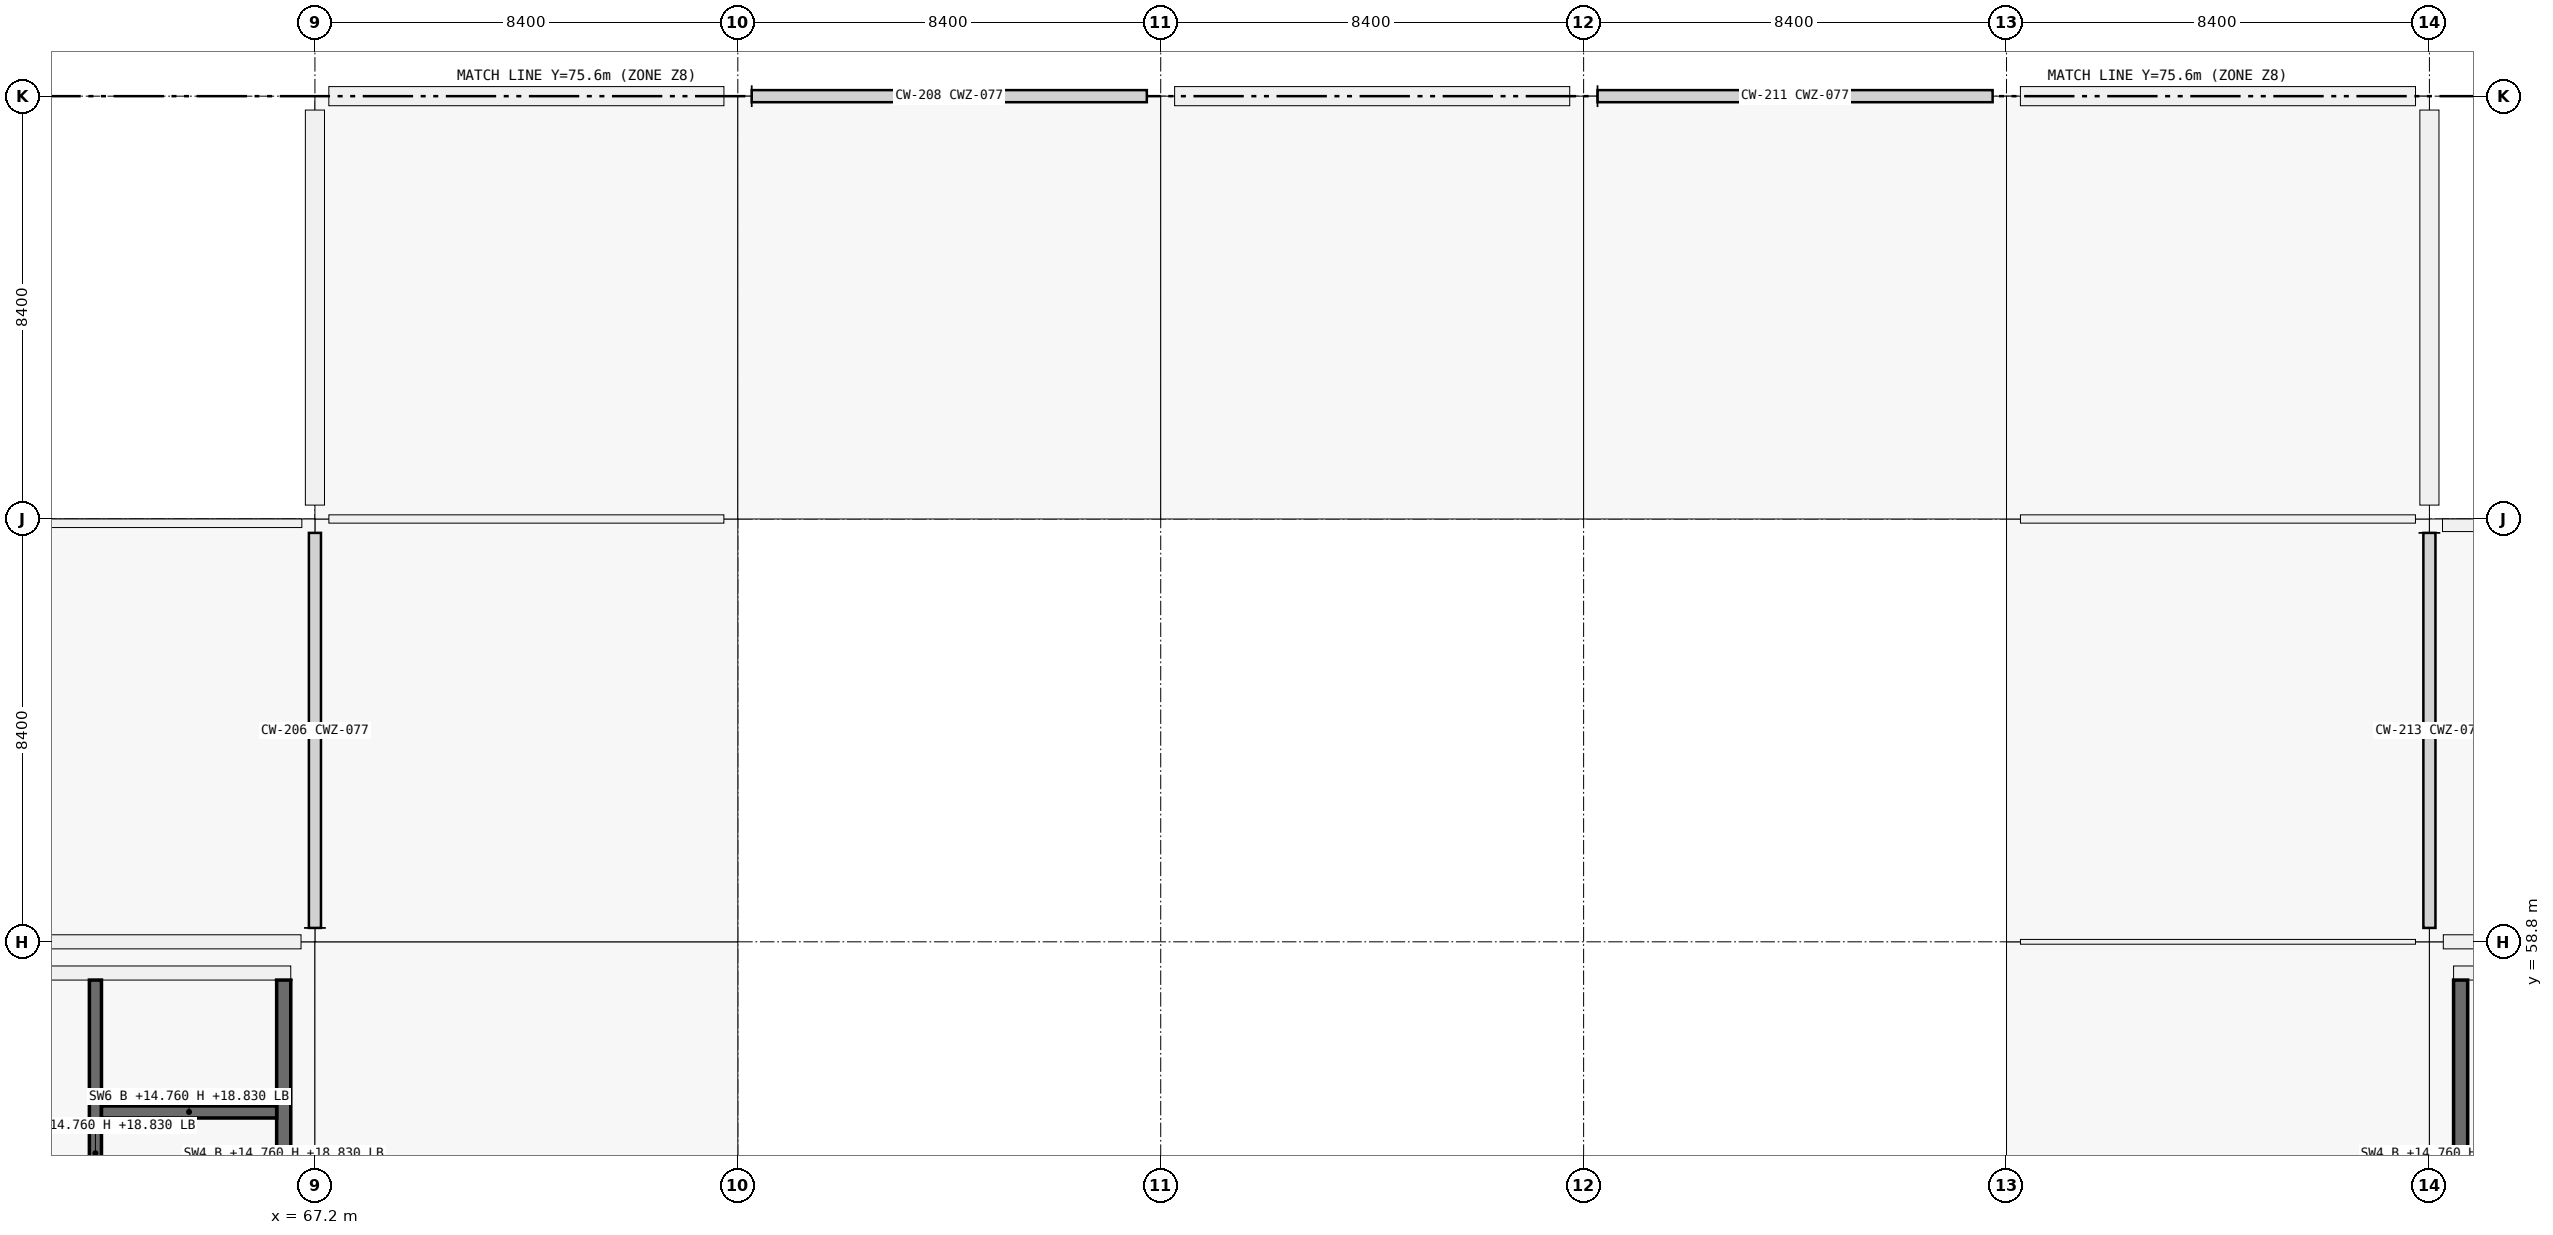
"""IFC4 building model, lengths in metres.
Left out: names, types, materials, properties, quantities, classifications, styles, units other than length and angle.
Written with IfcOpenShell. Run it as: python <this file> out.ifc"""

import sys

from ifc_helpers import new_model, si_unit, direction, frame, frame_2d, origin, origin_2d, place, context, subcontext, project, spatial, rectangle, i_section, extrude, element, fill, save


model = new_model("IFC4")
c1 = context("Model", 3, precision=1e-05, world=origin(), true_north=direction((0.0, 1.0)))
c2 = subcontext(c1, "Body", "Model", "MODEL_VIEW")
j1 = project(units=[si_unit("LENGTHUNIT", "METRE"), si_unit("PLANEANGLEUNIT", "RADIAN")], contexts=[c1])
p1 = place(None, origin())
s1 = spatial("IfcSite", under=j1, at=p1, CompositionType="ELEMENT")
p2 = place(p1, origin())
s2 = spatial("IfcBuilding", under=s1, at=p2, CompositionType="ELEMENT")
p3 = place(p2, frame((0.0, 0.0, 14.76)))
s3 = spatial("IfcBuildingStorey", under=s2, at=p3, CompositionType="ELEMENT", Elevation=14.76)
for number, where, z_axis, x_axis in (
    (1, (67.2, 58.8, 0.0), (0.0, 0.0, 1.0), (1.0, 0.0, 0.0)),
    (2, (67.2, 67.2, 0.0), (0.0, 0.0, 1.0), (1.0, 0.0, 0.0)),
    (3, (67.2, 75.6, 0.0), (0.0, 0.0, 1.0), (1.0, 0.0, 0.0)),
    (4, (75.6, 58.8, 0.0), (0.0, 0.0, 1.0), (1.0, 0.0, 0.0)),
    (5, (75.6, 67.2, 0.0), (0.0, 0.0, 1.0), (1.0, 0.0, 0.0)),
    (6, (75.6, 75.6, 0.0), (0.0, 0.0, 1.0), (1.0, 0.0, 0.0)),
    (7, (84.0, 67.2, 0.0), (0.0, 0.0, 1.0), (1.0, 0.0, 0.0)),
    (8, (84.0, 75.6, 0.0), (0.0, 0.0, 1.0), (1.0, 0.0, 0.0)),
    (9, (92.4, 67.2, 0.0), (0.0, 0.0, 1.0), (1.0, 0.0, 0.0)),
    (10, (92.4, 75.6, 0.0), (0.0, 0.0, 1.0), (1.0, 0.0, 0.0)),
    (11, (100.8, 58.8, 0.0), (0.0, 0.0, 1.0), (1.0, 0.0, 0.0)),
    (12, (100.8, 67.2, 0.0), (0.0, 0.0, 1.0), (1.0, 0.0, 0.0)),
    (13, (100.8, 75.6, 0.0), (0.0, 0.0, 1.0), (1.0, 0.0, 0.0)),
    (14, (109.2, 58.8, 0.0), (0.0, 0.0, 1.0), (1.0, 0.0, 0.0)),
    (15, (109.2, 67.2, 0.0), (0.0, 0.0, 1.0), (1.0, 0.0, 0.0)),
    (16, (109.2, 75.6, 0.0), (0.0, 0.0, 1.0), (1.0, 0.0, 0.0)),
):
    element("IfcColumn", number, at=place(p3, frame(where, z_axis=z_axis, x_axis=x_axis)), inside=s3, PredefinedType="COLUMN", context=c2, shape_type="SweptSolid", body=[
        extrude(rectangle(XDim=0.55, YDim=0.55, at=origin_2d()), origin(), (0.0, 0.0, 1.0), 4.14),
    ])
p4 = place(p3, frame((67.2, 58.8, 4.14), z_axis=(0.0, 0.0, 1.0), x_axis=(1.0, 0.0, 0.0)))
e17 = element("IfcColumn", 17, at=p4, inside=s3, PredefinedType="COLUMN", context=c2, shape_type="SweptSolid", body=[
    extrude(i_section(OverallWidth=0.305, OverallDepth=0.308, WebThickness=0.01, FlangeThickness=0.015, FilletRadius=0.017, at=origin_2d()), origin(), (0.0, 0.0, 1.0), 2.558),
])
p5 = place(p3, frame((67.2, 67.2, 4.14), z_axis=(0.0, 0.0, 1.0), x_axis=(1.0, 0.0, 0.0)))
e18 = element("IfcColumn", 18, at=p5, inside=s3, PredefinedType="COLUMN", context=c2, shape_type="SweptSolid", body=[
    extrude(i_section(OverallWidth=0.305, OverallDepth=0.308, WebThickness=0.01, FlangeThickness=0.015, FilletRadius=0.017, at=origin_2d()), origin(), (0.0, 0.0, 1.0), 1.709),
])
p6 = place(p3, frame((109.2, 58.8, 4.14), z_axis=(0.0, 0.0, 1.0), x_axis=(1.0, 0.0, 0.0)))
e19 = element("IfcColumn", 19, at=p6, inside=s3, PredefinedType="COLUMN", context=c2, shape_type="SweptSolid", body=[
    extrude(i_section(OverallWidth=0.305, OverallDepth=0.308, WebThickness=0.01, FlangeThickness=0.015, FilletRadius=0.017, at=origin_2d()), origin(), (0.0, 0.0, 1.0), 2.558),
])
p7 = place(p3, frame((109.2, 67.2, 4.14), z_axis=(0.0, 0.0, 1.0), x_axis=(1.0, 0.0, 0.0)))
e20 = element("IfcColumn", 20, at=p7, inside=s3, PredefinedType="COLUMN", context=c2, shape_type="SweptSolid", body=[
    extrude(i_section(OverallWidth=0.305, OverallDepth=0.308, WebThickness=0.01, FlangeThickness=0.015, FilletRadius=0.017, at=origin_2d()), origin(), (0.0, 0.0, 1.0), 1.709),
])
p8 = place(p3, frame((59.076, 58.8, 0.0), z_axis=(0.0, 0.0, 1.0), x_axis=(1.0, 0.0, 0.0)))
e21 = element("IfcWall", 21, at=p8, inside=s3, PredefinedType="SOLIDWALL", context=c2, shape_type="SweptSolid", body=[
    extrude(rectangle(XDim=7.848, YDim=0.28, at=frame_2d((3.924, 0.0))), origin(), (0.0, 0.0, 1.0), 3.37),
])
for number, where, z_axis, x_axis in (
    (22, (67.2, 67.476, 0.0), (0.0, 0.0, 1.0), (0.0, 1.0, 0.0)),
    (23, (67.476, 75.6, 0.0), (0.0, 0.0, 1.0), (1.0, 0.0, 0.0)),
):
    element("IfcWall", number, at=place(p3, frame(where, z_axis=z_axis, x_axis=x_axis)), inside=s3, PredefinedType="SOLIDWALL", context=c2, shape_type="SweptSolid", body=[
        extrude(rectangle(XDim=7.848, YDim=0.38, at=frame_2d((3.924, 0.0))), origin(), (0.0, 0.0, 1.0), 2.52),
    ])
for number, where, z_axis, x_axis in (
    (24, (84.276, 75.6, 0.0), (0.0, 0.0, 1.0), (1.0, 0.0, 0.0)),
    (25, (101.076, 75.6, 0.0), (0.0, 0.0, 1.0), (1.0, 0.0, 0.0)),
):
    element("IfcWall", number, at=place(p3, frame(where, z_axis=z_axis, x_axis=x_axis)), inside=s3, PredefinedType="SOLIDWALL", context=c2, shape_type="SweptSolid", body=[
        extrude(rectangle(XDim=7.848, YDim=0.38, at=frame_2d((3.924, 0.0))), origin(), (0.0, 0.0, 1.0), 2.52),
    ])
p9 = place(p3, frame((109.2, 75.324, 0.0), z_axis=(0.0, 0.0, 1.0), x_axis=(0.0, -1.0, 0.0)))
e26 = element("IfcWall", 26, at=p9, inside=s3, PredefinedType="SOLIDWALL", context=c2, shape_type="SweptSolid", body=[
    extrude(rectangle(XDim=7.848, YDim=0.38, at=frame_2d((3.924, 0.0))), origin(), (0.0, 0.0, 1.0), 2.52),
])
p10 = place(p3, frame((109.476, 58.8, 0.0), z_axis=(0.0, 0.0, 1.0), x_axis=(1.0, 0.0, 0.0)))
e27 = element("IfcWall", 27, at=p10, inside=s3, PredefinedType="SOLIDWALL", context=c2, shape_type="SweptSolid", body=[
    extrude(rectangle(XDim=7.848, YDim=0.28, at=frame_2d((3.924, 0.0))), origin(), (0.0, 0.0, 1.0), 3.37),
])
p11 = place(p3, frame((59.06, 67.115, 0.0), z_axis=(0.0, 0.0, 1.0), x_axis=(1.0, 0.0, 0.0)))
e28 = element("IfcWall", 28, at=p11, inside=s3, PredefinedType="PARAPET", context=c2, shape_type="SweptSolid", body=[
    extrude(rectangle(XDim=7.88, YDim=0.17, at=frame_2d((3.94, 0.0))), origin(), (0.0, 0.0, 1.0), 0.95),
])
p12 = place(p3, frame((109.46, 67.075, 0.0), z_axis=(0.0, 0.0, 1.0), x_axis=(1.0, 0.0, 0.0)))
e29 = element("IfcWall", 29, at=p12, inside=s3, PredefinedType="PARAPET", context=c2, shape_type="SweptSolid", body=[
    extrude(rectangle(XDim=7.88, YDim=0.25, at=frame_2d((3.94, 0.0))), origin(), (0.0, 0.0, 1.0), 0.95),
])
p13 = place(p3, frame((59.28, 58.18, 0.0), z_axis=(0.0, 0.0, 1.0), x_axis=(1.0, 0.0, 0.0)))
e30 = element("IfcWall", 30, at=p13, inside=s3, PredefinedType="SHEAR", context=c2, shape_type="SweptSolid", body=[
    extrude(rectangle(XDim=7.44, YDim=0.28, at=frame_2d((3.72, 0.0))), origin(), (0.0, 0.0, 1.0), 4.07),
])
p14 = place(p3, frame((66.58, 58.04, 0.0), z_axis=(0.0, 0.0, 1.0), x_axis=(0.0, -1.0, 0.0)))
e31 = element("IfcWall", 31, at=p14, inside=s3, PredefinedType="SHEAR", context=c2, shape_type="SweptSolid", body=[
    extrude(rectangle(XDim=6.88, YDim=0.28, at=frame_2d((3.44, 0.0))), origin(), (0.0, 0.0, 1.0), 4.07),
])
p15 = place(p14, frame((3.99, 0.0, 0.0)))
e32 = element("IfcOpeningElement", 32, at=p15, cuts=e31, PredefinedType="OPENING", context=c2, shape_type="SweptSolid", body=[
    extrude(rectangle(XDim=1.5, YDim=2.15, at=frame_2d((0.75, 1.075))), frame((0.0, 0.14, 0.0), z_axis=(0.0, -1.0, 0.0), x_axis=(1.0, 0.0, 0.0)), (0.0, 0.0, 1.0), 0.28),
])
p16 = place(p3, frame((62.84, 51.16, 0.0), z_axis=(0.0, 0.0, 1.0), x_axis=(0.0, 1.0, 0.0)))
e33 = element("IfcWall", 33, at=p16, inside=s3, PredefinedType="SHEAR", context=c2, shape_type="SweptSolid", body=[
    extrude(rectangle(XDim=6.88, YDim=0.24, at=frame_2d((3.44, 0.0))), origin(), (0.0, 0.0, 1.0), 4.07),
])
p17 = place(p16, frame((0.12, 0.0, 0.0)))
e34 = element("IfcOpeningElement", 34, at=p17, cuts=e33, PredefinedType="OPENING", context=c2, shape_type="SweptSolid", body=[
    extrude(rectangle(XDim=1.0, YDim=2.15, at=frame_2d((0.5, 1.075))), frame((0.0, 0.12, 0.0), z_axis=(0.0, -1.0, 0.0), x_axis=(1.0, 0.0, 0.0)), (0.0, 0.0, 1.0), 0.24),
])
p18 = place(p3, frame((62.96, 55.42, 0.0), z_axis=(0.0, 0.0, 1.0), x_axis=(1.0, 0.0, 0.0)))
e35 = element("IfcWall", 35, at=p18, inside=s3, PredefinedType="SHEAR", context=c2, shape_type="SweptSolid", body=[
    extrude(rectangle(XDim=3.48, YDim=0.24, at=frame_2d((1.74, 0.0))), origin(), (0.0, 0.0, 1.0), 4.07),
])
p19 = place(p18, frame((1.19, 0.0, 0.0)))
e36 = element("IfcOpeningElement", 36, at=p19, cuts=e35, PredefinedType="OPENING", context=c2, shape_type="SweptSolid", body=[
    extrude(rectangle(XDim=1.1, YDim=2.15, at=frame_2d((0.55, 1.075))), frame((0.0, 0.12, 0.0), z_axis=(0.0, -1.0, 0.0), x_axis=(1.0, 0.0, 0.0)), (0.0, 0.0, 1.0), 0.24),
])
p20 = place(p3, frame((109.82, 51.16, 0.0), z_axis=(0.0, 0.0, 1.0), x_axis=(0.0, 1.0, 0.0)))
e37 = element("IfcWall", 37, at=p20, inside=s3, PredefinedType="SHEAR", context=c2, shape_type="SweptSolid", body=[
    extrude(rectangle(XDim=6.88, YDim=0.28, at=frame_2d((3.44, 0.0))), origin(), (0.0, 0.0, 1.0), 4.07),
])
p21 = place(p3, frame((109.68, 58.18, 0.0), z_axis=(0.0, 0.0, 1.0), x_axis=(1.0, 0.0, 0.0)))
e38 = element("IfcWall", 38, at=p21, inside=s3, PredefinedType="SHEAR", context=c2, shape_type="SweptSolid", body=[
    extrude(rectangle(XDim=7.44, YDim=0.28, at=frame_2d((3.72, 0.0))), origin(), (0.0, 0.0, 1.0), 4.07),
])
p22 = place(p3, frame((67.477, 67.2, 0.0), z_axis=(0.0, 0.0, 1.0), x_axis=(1.0, 0.0, 0.0)))
e39 = element("IfcWall", 39, at=p22, inside=s3, PredefinedType="PARTITIONING", context=c2, shape_type="SweptSolid", body=[
    extrude(rectangle(XDim=7.846, YDim=0.165, at=frame_2d((3.923, 0.0))), origin(), (0.0, 0.0, 1.0), 3.19),
])
p23 = place(p22, frame((3.023, 0.0, 0.0)))
e40 = element("IfcOpeningElement", 40, at=p23, cuts=e39, PredefinedType="OPENING", context=c2, shape_type="SweptSolid", body=[
    extrude(rectangle(XDim=1.8, YDim=2.4, at=frame_2d((0.9, 1.2))), frame((0.0, 0.083, 0.0), z_axis=(0.0, -1.0, 0.0), x_axis=(1.0, 0.0, 0.0)), (0.0, 0.0, 1.0), 0.165),
])
p24 = place(p3, frame((101.077, 58.8, 0.0), z_axis=(0.0, 0.0, 1.0), x_axis=(1.0, 0.0, 0.0)))
e41 = element("IfcWall", 41, at=p24, inside=s3, PredefinedType="PARTITIONING", context=c2, shape_type="SweptSolid", body=[
    extrude(rectangle(XDim=7.846, YDim=0.095, at=frame_2d((3.923, 0.0))), origin(), (0.0, 0.0, 1.0), 3.19),
])
p25 = place(p24, frame((3.173, 0.0, 0.0)))
e42 = element("IfcOpeningElement", 42, at=p25, cuts=e41, PredefinedType="OPENING", context=c2, shape_type="SweptSolid", body=[
    extrude(rectangle(XDim=1.5, YDim=2.25, at=frame_2d((0.75, 1.125))), frame((0.0, 0.047, 0.0), z_axis=(0.0, -1.0, 0.0), x_axis=(1.0, 0.0, 0.0)), (0.0, 0.0, 1.0), 0.095),
])
p26 = place(p3, frame((101.077, 67.2, 0.0), z_axis=(0.0, 0.0, 1.0), x_axis=(1.0, 0.0, 0.0)))
e43 = element("IfcWall", 43, at=p26, inside=s3, PredefinedType="PARTITIONING", context=c2, shape_type="SweptSolid", body=[
    extrude(rectangle(XDim=7.846, YDim=0.165, at=frame_2d((3.923, 0.0))), origin(), (0.0, 0.0, 1.0), 3.19),
])
p27 = place(p26, frame((3.198, 0.0, 0.0)))
e44 = element("IfcOpeningElement", 44, at=p27, cuts=e43, PredefinedType="OPENING", context=c2, shape_type="SweptSolid", body=[
    extrude(rectangle(XDim=1.45, YDim=2.2, at=frame_2d((0.725, 1.1))), frame((0.0, 0.083, 0.0), z_axis=(0.0, -1.0, 0.0), x_axis=(1.0, 0.0, 0.0)), (0.0, 0.0, 1.0), 0.165),
])
p28 = place(p19, origin())
e45 = element("IfcDoor", 45, at=p28, inside=s3, OperationType="DOUBLE_DOOR_SLIDING", PredefinedType="DOOR", context=c2, shape_type="SweptSolid", body=[
    extrude(rectangle(XDim=1.1, YDim=2.15, at=frame_2d((0.55, 1.075))), frame((0.0, 0.025, 0.0), z_axis=(0.0, -1.0, 0.0), x_axis=(1.0, 0.0, 0.0)), (0.0, 0.0, 1.0), 0.05),
])
fill(e36, e45)
p29 = place(p23, origin())
e46 = element("IfcDoor", 46, at=p29, inside=s3, OperationType="DOUBLE_DOOR_SINGLE_SWING", PredefinedType="DOOR", context=c2, shape_type="SweptSolid", body=[
    extrude(rectangle(XDim=1.8, YDim=2.4, at=frame_2d((0.9, 1.2))), frame((0.0, 0.025, 0.0), z_axis=(0.0, -1.0, 0.0), x_axis=(1.0, 0.0, 0.0)), (0.0, 0.0, 1.0), 0.05),
])
fill(e40, e46)
p30 = place(p25, origin())
e47 = element("IfcDoor", 47, at=p30, inside=s3, OperationType="DOUBLE_DOOR_SINGLE_SWING", PredefinedType="DOOR", context=c2, shape_type="SweptSolid", body=[
    extrude(rectangle(XDim=1.5, YDim=2.25, at=frame_2d((0.75, 1.125))), frame((0.0, 0.025, 0.0), z_axis=(0.0, -1.0, 0.0), x_axis=(1.0, 0.0, 0.0)), (0.0, 0.0, 1.0), 0.05),
])
fill(e42, e47)
p31 = place(p27, origin())
e48 = element("IfcDoor", 48, at=p31, inside=s3, OperationType="DOUBLE_DOOR_SINGLE_SWING", PredefinedType="DOOR", context=c2, shape_type="SweptSolid", body=[
    extrude(rectangle(XDim=1.45, YDim=2.2, at=frame_2d((0.725, 1.1))), frame((0.0, 0.025, 0.0), z_axis=(0.0, -1.0, 0.0), x_axis=(1.0, 0.0, 0.0)), (0.0, 0.0, 1.0), 0.05),
])
fill(e44, e48)
save(model, sys.argv[1])
